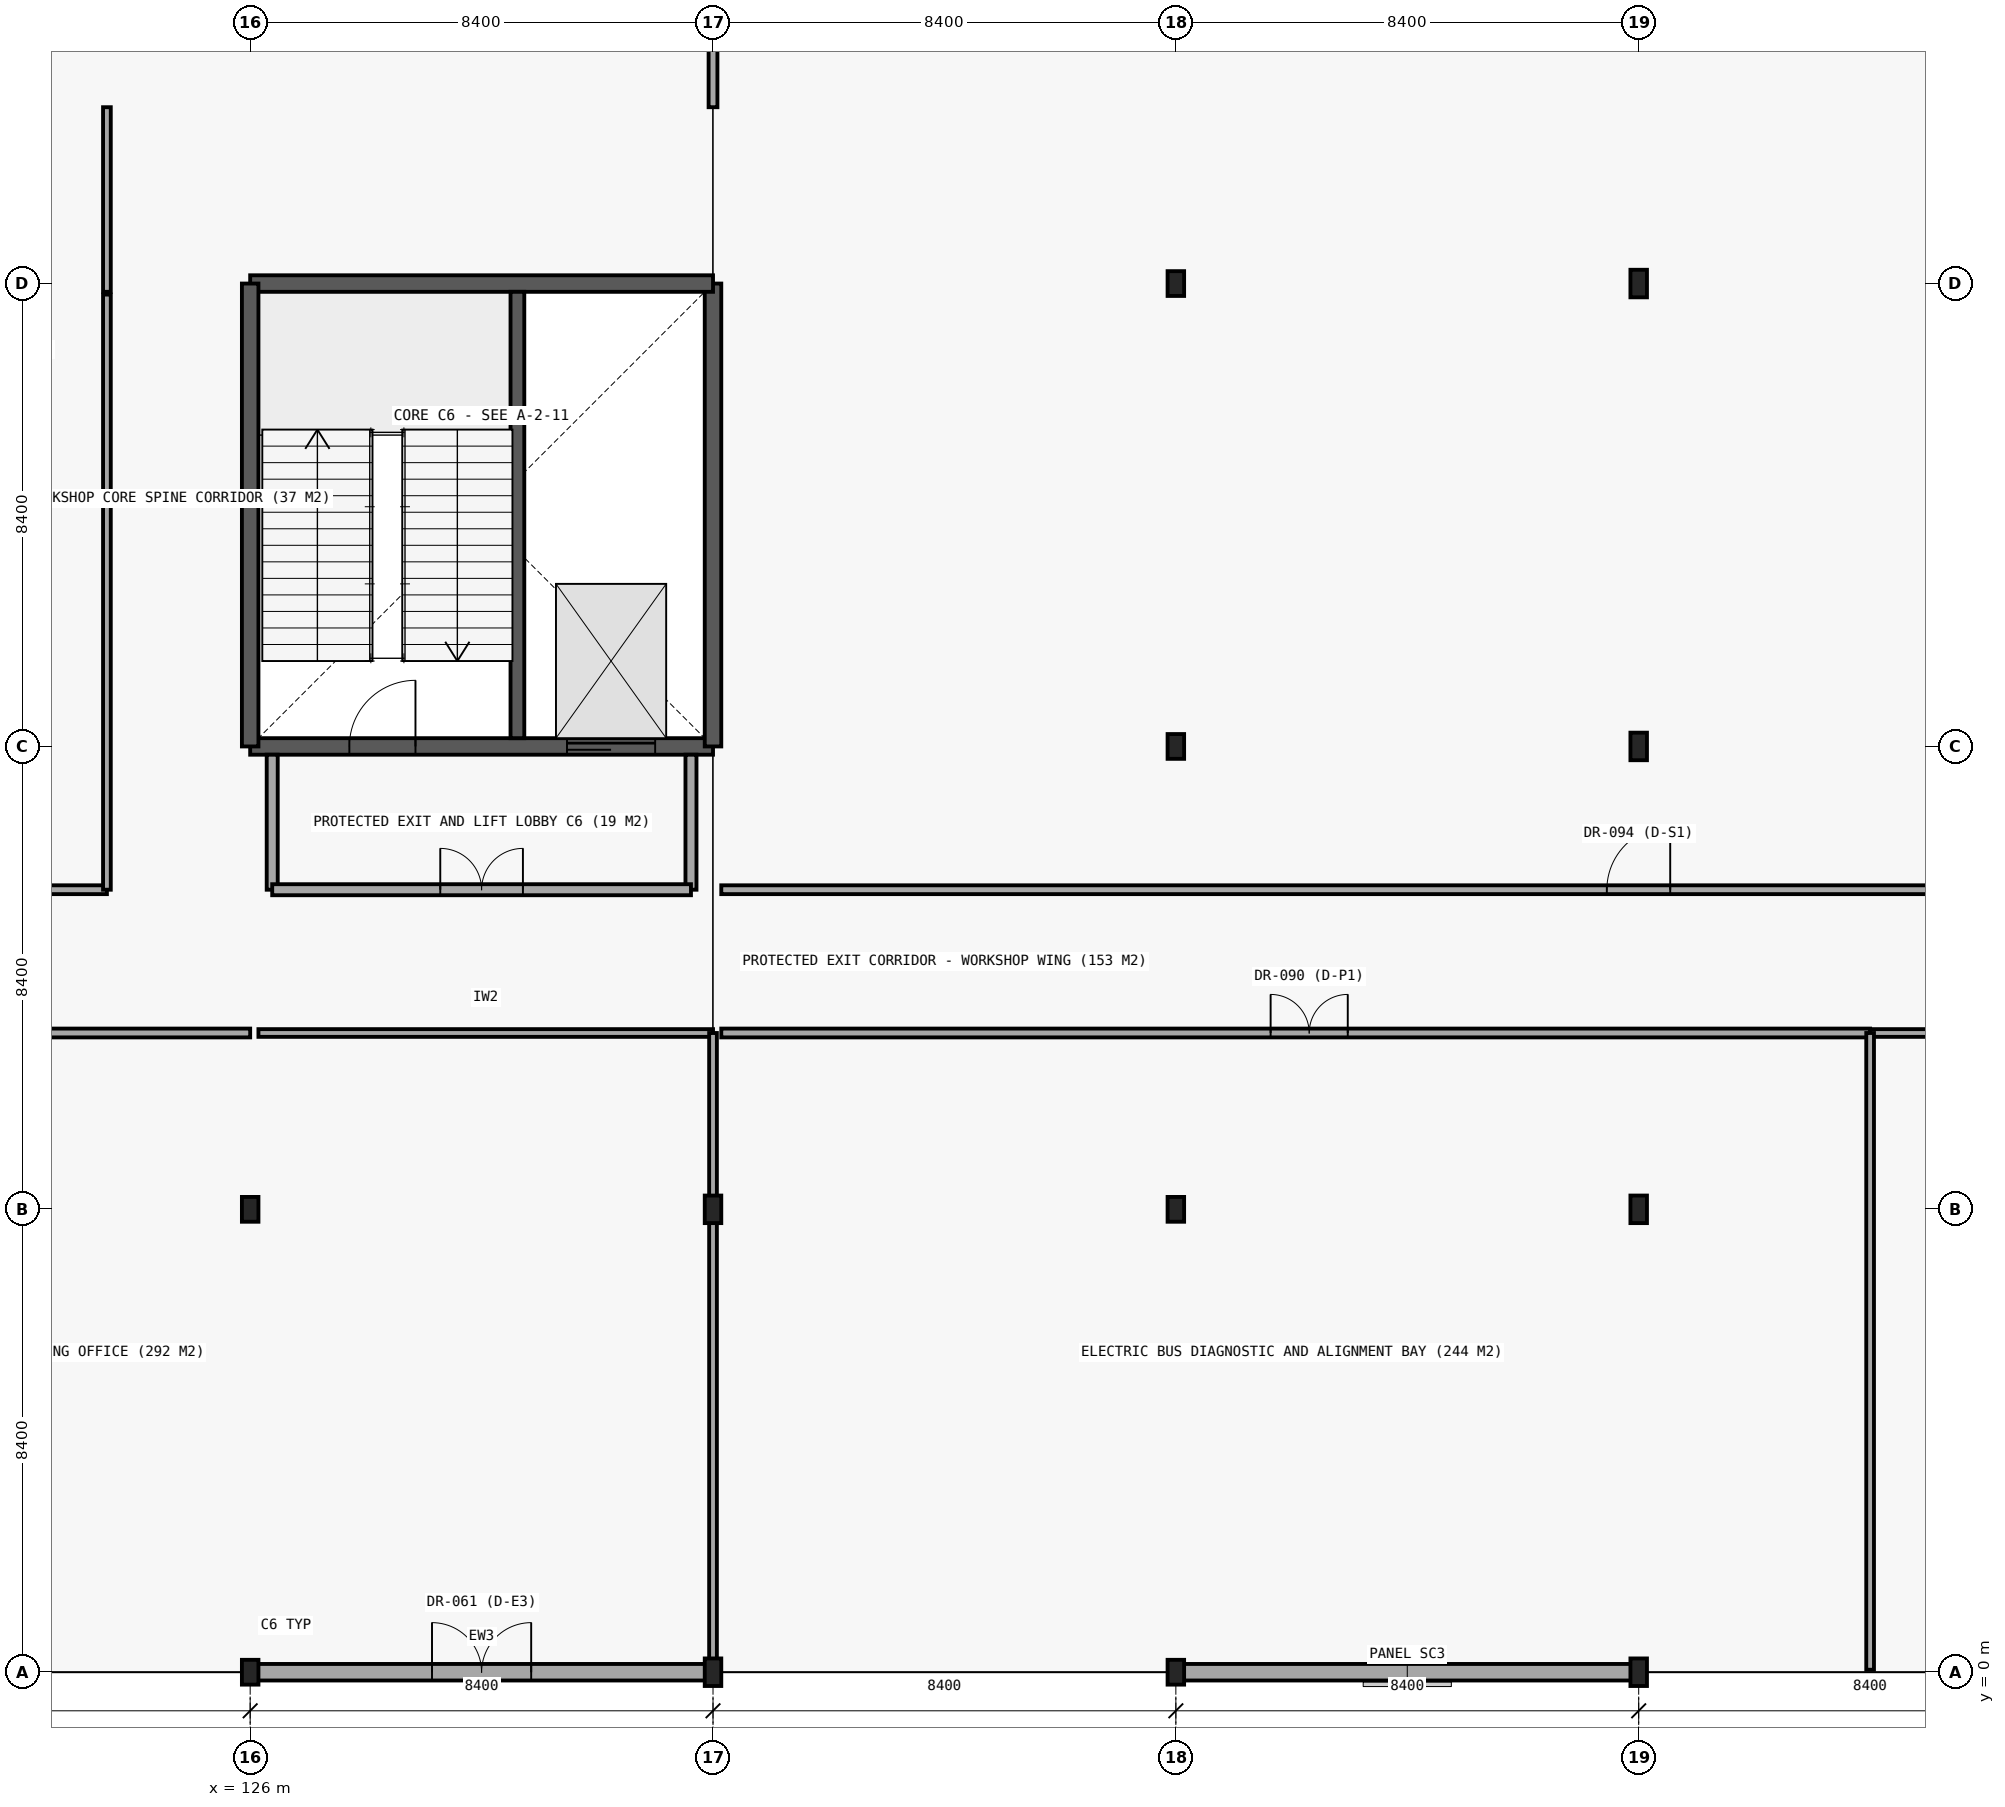
"""IFC4 building model, lengths in metres.
Left out: names, types, materials, properties, quantities, classifications, styles, units other than length and angle.
Written with IfcOpenShell. Run it as: python <this file> out.ifc"""

import sys

from ifc_helpers import new_model, si_unit, direction, frame, frame_2d, origin, origin_2d, place, context, subcontext, project, spatial, rectangle, i_section, extrude, element, fill, save


model = new_model("IFC4")
c1 = context("Model", 3, precision=1e-05, world=origin(), true_north=direction((0.0, 1.0)))
c2 = subcontext(c1, "Body", "Model", "MODEL_VIEW")
j1 = project(units=[si_unit("LENGTHUNIT", "METRE"), si_unit("PLANEANGLEUNIT", "RADIAN")], contexts=[c1])
p1 = place(None, origin())
s1 = spatial("IfcSite", under=j1, at=p1, CompositionType="ELEMENT")
p2 = place(p1, origin())
s2 = spatial("IfcBuilding", under=s1, at=p2, CompositionType="ELEMENT")
p3 = place(p2, origin())
s3 = spatial("IfcBuildingStorey", under=s2, at=p3, CompositionType="ELEMENT", Elevation=0.0)
p4 = place(p3, frame((126.0, 16.8, 0.0), z_axis=(0.0, 0.0, 1.0), x_axis=(1.0, 0.0, 0.0)))
e1 = element("IfcWall", 1, at=p4, inside=s3, PredefinedType="SHEAR", context=c2, shape_type="SweptSolid", body=[
    extrude(rectangle(XDim=8.4, YDim=0.3, at=frame_2d((4.2, 0.0))), origin(), (0.0, 0.0, 1.0), 4.8),
])
p5 = place(p4, frame((1.8, 0.0, 0.0)))
e2 = element("IfcOpeningElement", 2, at=p5, cuts=e1, PredefinedType="OPENING", context=c2, shape_type="SweptSolid", body=[
    extrude(rectangle(XDim=1.2, YDim=2.2, at=frame_2d((0.6, 1.1))), frame((0.0, 0.16, 0.0), z_axis=(0.0, -1.0, 0.0), x_axis=(1.0, 0.0, 0.0)), (0.0, 0.0, 1.0), 0.32),
])
p6 = place(p4, frame((5.75, 0.0, 0.0)))
e3 = element("IfcOpeningElement", 3, at=p6, cuts=e1, PredefinedType="OPENING", context=c2, shape_type="SweptSolid", body=[
    extrude(rectangle(XDim=1.6, YDim=2.4, at=frame_2d((0.8, 1.2))), frame((0.0, 0.16, 0.0), z_axis=(0.0, -1.0, 0.0), x_axis=(1.0, 0.0, 0.0)), (0.0, 0.0, 1.0), 0.32),
])
for number, where, z_axis, x_axis in (
    (4, (134.4, 16.8, 0.0), (0.0, 0.0, 1.0), (0.0, 1.0, 0.0)),
    (5, (134.4, 25.2, 0.0), (0.0, 0.0, 1.0), (-1.0, 0.0, 0.0)),
    (6, (126.0, 25.2, 0.0), (0.0, 0.0, 1.0), (0.0, -1.0, 0.0)),
):
    element("IfcWall", number, at=place(p3, frame(where, z_axis=z_axis, x_axis=x_axis)), inside=s3, PredefinedType="SHEAR", context=c2, shape_type="SweptSolid", body=[
        extrude(rectangle(XDim=8.4, YDim=0.3, at=frame_2d((4.2, 0.0))), origin(), (0.0, 0.0, 1.0), 4.8),
    ])
p7 = place(p3, frame((130.85, 16.95, 0.0), z_axis=(0.0, 0.0, 1.0), x_axis=(0.0, 1.0, 0.0)))
e7 = element("IfcWall", 7, at=p7, inside=s3, PredefinedType="SHEAR", context=c2, shape_type="SweptSolid", body=[
    extrude(rectangle(XDim=8.1, YDim=0.25, at=frame_2d((4.05, 0.0))), origin(), (0.0, 0.0, 1.0), 4.8),
])
for number, where, z_axis, x_axis in (
    (8, (126.0, 0.0, 0.0), (0.0, 0.0, 1.0), (1.0, 0.0, 0.0)),
    (9, (126.0, 8.4, 0.0), (0.0, 0.0, 1.0), (1.0, 0.0, 0.0)),
):
    element("IfcColumn", number, at=place(p3, frame(where, z_axis=z_axis, x_axis=x_axis)), inside=s3, PredefinedType="COLUMN", context=c2, shape_type="SweptSolid", body=[
        extrude(i_section(OverallWidth=0.3, OverallDepth=0.45, WebThickness=0.014, FlangeThickness=0.026, FilletRadius=0.027, at=origin_2d()), origin(), (0.0, 0.0, 1.0), 4.8),
    ])
for number, where, z_axis, x_axis in (
    (10, (134.4, 0.0, 0.0), (0.0, 0.0, 1.0), (1.0, 0.0, 0.0)),
    (11, (134.4, 8.4, 0.0), (0.0, 0.0, 1.0), (1.0, 0.0, 0.0)),
):
    element("IfcColumn", number, at=place(p3, frame(where, z_axis=z_axis, x_axis=x_axis)), inside=s3, PredefinedType="COLUMN", context=c2, shape_type="SweptSolid", body=[
        extrude(i_section(OverallWidth=0.3, OverallDepth=0.5, WebThickness=0.014, FlangeThickness=0.028, FilletRadius=0.027, at=origin_2d()), origin(), (0.0, 0.0, 1.0), 4.8),
    ])
for number, where, z_axis, x_axis in (
    (12, (142.8, 0.0, 0.0), (0.0, 0.0, 1.0), (1.0, 0.0, 0.0)),
    (13, (142.8, 8.4, 0.0), (0.0, 0.0, 1.0), (1.0, 0.0, 0.0)),
    (14, (142.8, 16.8, 0.0), (0.0, 0.0, 1.0), (1.0, 0.0, 0.0)),
    (15, (142.8, 25.2, 0.0), (0.0, 0.0, 1.0), (1.0, 0.0, 0.0)),
):
    element("IfcColumn", number, at=place(p3, frame(where, z_axis=z_axis, x_axis=x_axis)), inside=s3, PredefinedType="COLUMN", context=c2, shape_type="SweptSolid", body=[
        extrude(i_section(OverallWidth=0.3, OverallDepth=0.45, WebThickness=0.014, FlangeThickness=0.026, FilletRadius=0.027, at=origin_2d()), origin(), (0.0, 0.0, 1.0), 4.8),
    ])
for number, where, z_axis, x_axis in (
    (16, (151.2, 0.0, 0.0), (0.0, 0.0, 1.0), (1.0, 0.0, 0.0)),
    (17, (151.2, 8.4, 0.0), (0.0, 0.0, 1.0), (1.0, 0.0, 0.0)),
    (18, (151.2, 16.8, 0.0), (0.0, 0.0, 1.0), (1.0, 0.0, 0.0)),
    (19, (151.2, 25.2, 0.0), (0.0, 0.0, 1.0), (1.0, 0.0, 0.0)),
):
    element("IfcColumn", number, at=place(p3, frame(where, z_axis=z_axis, x_axis=x_axis)), inside=s3, PredefinedType="COLUMN", context=c2, shape_type="SweptSolid", body=[
        extrude(i_section(OverallWidth=0.3, OverallDepth=0.5, WebThickness=0.014, FlangeThickness=0.028, FilletRadius=0.027, at=origin_2d()), origin(), (0.0, 0.0, 1.0), 4.8),
    ])
p8 = place(p3, frame((126.0, 0.0, 0.0), z_axis=(0.0, 0.0, 1.0), x_axis=(1.0, 0.0, 0.0)))
e20 = element("IfcWall", 20, at=p8, inside=s3, PredefinedType="STANDARD", context=c2, shape_type="SweptSolid", body=[
    extrude(rectangle(XDim=8.4, YDim=0.3, at=frame_2d((4.2, 0.0))), origin(), (0.0, 0.0, 1.0), 4.18),
])
p9 = place(p8, frame((3.3, 0.0, 0.0)))
e21 = element("IfcOpeningElement", 21, at=p9, cuts=e20, PredefinedType="OPENING", context=c2, shape_type="SweptSolid", body=[
    extrude(rectangle(XDim=1.8, YDim=2.3, at=frame_2d((0.9, 1.15))), frame((0.0, 0.16, 0.0), z_axis=(0.0, -1.0, 0.0), x_axis=(1.0, 0.0, 0.0)), (0.0, 0.0, 1.0), 0.32),
])
p10 = place(p3, frame((142.8, 0.0, 0.0), z_axis=(0.0, 0.0, 1.0), x_axis=(1.0, 0.0, 0.0)))
e22 = element("IfcWall", 22, at=p10, inside=s3, PredefinedType="STANDARD", context=c2, shape_type="SweptSolid", body=[
    extrude(rectangle(XDim=8.4, YDim=0.3, at=frame_2d((4.2, 0.0))), origin(), (0.0, 0.0, 1.0), 4.18),
])
for number, where, z_axis, x_axis in (
    (23, (126.4, 14.2, 0.0), (0.0, 0.0, 1.0), (0.0, 1.0, 0.0)),
    (24, (134.0, 14.2, 0.0), (0.0, 0.0, 1.0), (0.0, 1.0, 0.0)),
):
    element("IfcWall", number, at=place(p3, frame(where, z_axis=z_axis, x_axis=x_axis)), inside=s3, PredefinedType="PARTITIONING", context=c2, shape_type="SweptSolid", body=[
        extrude(rectangle(XDim=2.45, YDim=0.2, at=frame_2d((1.225, 0.0))), origin(), (0.0, 0.0, 1.0), 4.12),
    ])
p11 = place(p3, frame((126.4, 14.2, 0.0), z_axis=(0.0, 0.0, 1.0), x_axis=(1.0, 0.0, 0.0)))
e25 = element("IfcWall", 25, at=p11, inside=s3, PredefinedType="PARTITIONING", context=c2, shape_type="SweptSolid", body=[
    extrude(rectangle(XDim=7.6, YDim=0.2, at=frame_2d((3.8, 0.0))), origin(), (0.0, 0.0, 1.0), 4.12),
])
p12 = place(p11, frame((3.05, 0.0, 0.0)))
e26 = element("IfcOpeningElement", 26, at=p12, cuts=e25, PredefinedType="OPENING", context=c2, shape_type="SweptSolid", body=[
    extrude(rectangle(XDim=1.5, YDim=2.2, at=frame_2d((0.75, 1.1))), frame((0.0, 0.11, 0.0), z_axis=(0.0, -1.0, 0.0), x_axis=(1.0, 0.0, 0.0)), (0.0, 0.0, 1.0), 0.22),
])
p13 = place(p3, frame((109.2, 11.6, 0.0), z_axis=(0.0, 0.0, 1.0), x_axis=(1.0, 0.0, 0.0)))
e27 = element("IfcWall", 27, at=p13, inside=s3, PredefinedType="PARTITIONING", context=c2, shape_type="SweptSolid", body=[
    extrude(rectangle(XDim=16.8, YDim=0.16, at=frame_2d((8.4, 0.0))), origin(), (0.0, 0.0, 1.0), 4.1),
])
p14 = place(p3, frame((126.15, 11.6, 0.0), z_axis=(0.0, 0.0, 1.0), x_axis=(1.0, 0.0, 0.0)))
e28 = element("IfcWall", 28, at=p14, inside=s3, PredefinedType="PARTITIONING", context=c2, shape_type="SweptSolid", body=[
    extrude(rectangle(XDim=8.25, YDim=0.14, at=frame_2d((4.125, 0.0))), origin(), (0.0, 0.0, 1.0), 4.1),
])
p15 = place(p3, frame((134.55, 11.6, 0.0), z_axis=(0.0, 0.0, 1.0), x_axis=(1.0, 0.0, 0.0)))
e29 = element("IfcWall", 29, at=p15, inside=s3, PredefinedType="PARTITIONING", context=c2, shape_type="SweptSolid", body=[
    extrude(rectangle(XDim=20.85, YDim=0.16, at=frame_2d((10.425, 0.0))), origin(), (0.0, 0.0, 1.0), 4.1),
])
p16 = place(p15, frame((9.97, 0.0, 0.0)))
e30 = element("IfcOpeningElement", 30, at=p16, cuts=e29, PredefinedType="OPENING", context=c2, shape_type="SweptSolid", body=[
    extrude(rectangle(XDim=1.4, YDim=2.25, at=frame_2d((0.7, 1.125))), frame((0.0, 0.09, 0.0), z_axis=(0.0, -1.0, 0.0), x_axis=(1.0, 0.0, 0.0)), (0.0, 0.0, 1.0), 0.18),
])
p17 = place(p3, frame((155.4, 11.6, 0.0), z_axis=(0.0, 0.0, 1.0), x_axis=(1.0, 0.0, 0.0)))
e31 = element("IfcWall", 31, at=p17, inside=s3, PredefinedType="PARTITIONING", context=c2, shape_type="SweptSolid", body=[
    extrude(rectangle(XDim=12.445, YDim=0.14, at=frame_2d((6.223, 0.0))), origin(), (0.0, 0.0, 1.0), 4.1),
])
p18 = place(p17, frame((5.722, 0.0, 0.0)))
e32 = element("IfcOpeningElement", 32, at=p18, cuts=e31, PredefinedType="OPENING", context=c2, shape_type="SweptSolid", body=[
    extrude(rectangle(XDim=1.0, YDim=2.15, at=frame_2d((0.5, 1.075))), frame((0.0, 0.08, 0.0), z_axis=(0.0, -1.0, 0.0), x_axis=(1.0, 0.0, 0.0)), (0.0, 0.0, 1.0), 0.16),
])
p19 = place(p3, frame((109.2, 14.2, 0.0), z_axis=(0.0, 0.0, 1.0), x_axis=(1.0, 0.0, 0.0)))
e33 = element("IfcWall", 33, at=p19, inside=s3, PredefinedType="PARTITIONING", context=c2, shape_type="SweptSolid", body=[
    extrude(rectangle(XDim=14.2, YDim=0.16, at=frame_2d((7.1, 0.0))), origin(), (0.0, 0.0, 1.0), 4.1),
])
p20 = place(p19, frame((6.4, 0.0, 0.0)))
e34 = element("IfcOpeningElement", 34, at=p20, cuts=e33, PredefinedType="OPENING", context=c2, shape_type="SweptSolid", body=[
    extrude(rectangle(XDim=1.4, YDim=2.25, at=frame_2d((0.7, 1.125))), frame((0.0, 0.09, 0.0), z_axis=(0.0, -1.0, 0.0), x_axis=(1.0, 0.0, 0.0)), (0.0, 0.0, 1.0), 0.18),
])
p21 = place(p3, frame((134.55, 14.2, 0.0), z_axis=(0.0, 0.0, 1.0), x_axis=(1.0, 0.0, 0.0)))
e35 = element("IfcWall", 35, at=p21, inside=s3, PredefinedType="PARTITIONING", context=c2, shape_type="SweptSolid", body=[
    extrude(rectangle(XDim=33.295, YDim=0.16, at=frame_2d((16.647, 0.0))), origin(), (0.0, 0.0, 1.0), 4.1),
])
p22 = place(p21, frame((16.072, 0.0, 0.0)))
e36 = element("IfcOpeningElement", 36, at=p22, cuts=e35, PredefinedType="OPENING", context=c2, shape_type="SweptSolid", body=[
    extrude(rectangle(XDim=1.15, YDim=2.15, at=frame_2d((0.575, 1.075))), frame((0.0, 0.09, 0.0), z_axis=(0.0, -1.0, 0.0), x_axis=(1.0, 0.0, 0.0)), (0.0, 0.0, 1.0), 0.18),
])
p23 = place(p3, frame((123.4, 14.2, 0.0), z_axis=(0.0, 0.0, 1.0), x_axis=(0.0, 1.0, 0.0)))
e37 = element("IfcWall", 37, at=p23, inside=s3, PredefinedType="PARTITIONING", context=c2, shape_type="SweptSolid", body=[
    extrude(rectangle(XDim=10.8, YDim=0.14, at=frame_2d((5.4, 0.0))), origin(), (0.0, 0.0, 1.0), 4.1),
])
p24 = place(p3, frame((123.4, 25.05, 0.0), z_axis=(0.0, 0.0, 1.0), x_axis=(0.0, 1.0, 0.0)))
e38 = element("IfcWall", 38, at=p24, inside=s3, PredefinedType="PARTITIONING", context=c2, shape_type="SweptSolid", body=[
    extrude(rectangle(XDim=3.35, YDim=0.14, at=frame_2d((1.675, 0.0))), origin(), (0.0, 0.0, 1.0), 4.1),
])
p25 = place(p3, frame((134.4, 0.155, 0.0), z_axis=(0.0, 0.0, 1.0), x_axis=(0.0, 1.0, 0.0)))
e39 = element("IfcWall", 39, at=p25, inside=s3, PredefinedType="PARTITIONING", context=c2, shape_type="SweptSolid", body=[
    extrude(rectangle(XDim=11.445, YDim=0.14, at=frame_2d((5.723, 0.0))), origin(), (0.0, 0.0, 1.0), 4.05),
])
p26 = place(p3, frame((134.4, 28.4, 0.0), z_axis=(0.0, 0.0, 1.0), x_axis=(0.0, 1.0, 0.0)))
e40 = element("IfcWall", 40, at=p26, inside=s3, PredefinedType="PARTITIONING", context=c2, shape_type="SweptSolid", body=[
    extrude(rectangle(XDim=21.845, YDim=0.16, at=frame_2d((10.923, 0.0))), origin(), (0.0, 0.0, 1.0), 4.05),
])
p27 = place(p26, frame((10.422, 0.0, 0.0)))
e41 = element("IfcOpeningElement", 41, at=p27, cuts=e40, PredefinedType="OPENING", context=c2, shape_type="SweptSolid", body=[
    extrude(rectangle(XDim=1.0, YDim=2.15, at=frame_2d((0.5, 1.075))), frame((0.0, 0.09, 0.0), z_axis=(0.0, -1.0, 0.0), x_axis=(1.0, 0.0, 0.0)), (0.0, 0.0, 1.0), 0.18),
])
p28 = place(p3, frame((155.4, 0.045, 0.0), z_axis=(0.0, 0.0, 1.0), x_axis=(0.0, 1.0, 0.0)))
e42 = element("IfcWall", 42, at=p28, inside=s3, PredefinedType="PARTITIONING", context=c2, shape_type="SweptSolid", body=[
    extrude(rectangle(XDim=11.555, YDim=0.14, at=frame_2d((5.778, 0.0))), origin(), (0.0, 0.0, 1.0), 4.1),
])
p29 = place(p9, origin())
e43 = element("IfcDoor", 43, at=p29, inside=s3, OperationType="DOUBLE_DOOR_SINGLE_SWING", PredefinedType="DOOR", context=c2, shape_type="SweptSolid", body=[
    extrude(rectangle(XDim=1.8, YDim=2.3, at=frame_2d((0.9, 1.15))), frame((0.0, 0.025, 0.0), z_axis=(0.0, -1.0, 0.0), x_axis=(1.0, 0.0, 0.0)), (0.0, 0.0, 1.0), 0.05),
])
fill(e21, e43)
p30 = place(p5, origin())
e44 = element("IfcDoor", 44, at=p30, inside=s3, OperationType="SINGLE_SWING_RIGHT", PredefinedType="DOOR", context=c2, shape_type="SweptSolid", body=[
    extrude(rectangle(XDim=1.2, YDim=2.2, at=frame_2d((0.6, 1.1))), frame((0.0, 0.025, 0.0), z_axis=(0.0, -1.0, 0.0), x_axis=(1.0, 0.0, 0.0)), (0.0, 0.0, 1.0), 0.05),
])
fill(e2, e44)
p31 = place(p6, origin())
e45 = element("IfcDoor", 45, at=p31, inside=s3, OperationType="SLIDING_TO_LEFT", PredefinedType="DOOR", context=c2, shape_type="SweptSolid", body=[
    extrude(rectangle(XDim=1.6, YDim=2.4, at=frame_2d((0.8, 1.2))), frame((0.0, 0.025, 0.0), z_axis=(0.0, -1.0, 0.0), x_axis=(1.0, 0.0, 0.0)), (0.0, 0.0, 1.0), 0.05),
])
fill(e3, e45)
p32 = place(p12, origin())
e46 = element("IfcDoor", 46, at=p32, inside=s3, OperationType="DOUBLE_DOOR_SINGLE_SWING", PredefinedType="DOOR", context=c2, shape_type="SweptSolid", body=[
    extrude(rectangle(XDim=1.5, YDim=2.2, at=frame_2d((0.75, 1.1))), frame((0.0, 0.025, 0.0), z_axis=(0.0, -1.0, 0.0), x_axis=(1.0, 0.0, 0.0)), (0.0, 0.0, 1.0), 0.05),
])
fill(e26, e46)
p33 = place(p16, origin())
e47 = element("IfcDoor", 47, at=p33, inside=s3, OperationType="DOUBLE_DOOR_SINGLE_SWING", PredefinedType="DOOR", context=c2, shape_type="SweptSolid", body=[
    extrude(rectangle(XDim=1.4, YDim=2.25, at=frame_2d((0.7, 1.125))), frame((0.0, 0.025, 0.0), z_axis=(0.0, -1.0, 0.0), x_axis=(1.0, 0.0, 0.0)), (0.0, 0.0, 1.0), 0.05),
])
fill(e30, e47)
p34 = place(p22, origin())
e48 = element("IfcDoor", 48, at=p34, inside=s3, OperationType="SINGLE_SWING_RIGHT", PredefinedType="DOOR", context=c2, shape_type="SweptSolid", body=[
    extrude(rectangle(XDim=1.15, YDim=2.15, at=frame_2d((0.575, 1.075))), frame((0.0, 0.025, 0.0), z_axis=(0.0, -1.0, 0.0), x_axis=(1.0, 0.0, 0.0)), (0.0, 0.0, 1.0), 0.05),
])
fill(e36, e48)
save(model, sys.argv[1])
